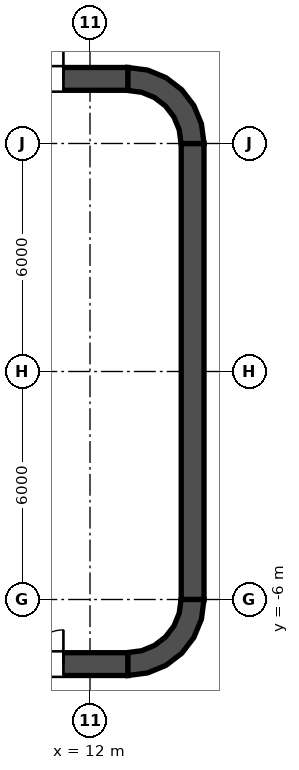
"""IFC4 building model, lengths in metres.
Left out: names, types, materials, properties, quantities, classifications, styles, units other than length and angle.
Written with IfcOpenShell. Run it as: python <this file> out.ifc"""

import sys

from ifc_helpers import new_model, si_unit, direction, frame, frame_2d, origin, place, context, subcontext, project, spatial, polyline, rectangle, outline, extrude, element, fill, save


model = new_model("IFC4")
c1 = context("Model", 3, precision=1e-05, world=origin(), true_north=direction((0.0, 1.0)))
c2 = subcontext(c1, "Body", "Model", "MODEL_VIEW")
j1 = project(units=[si_unit("LENGTHUNIT", "METRE"), si_unit("PLANEANGLEUNIT", "RADIAN")], contexts=[c1])
p1 = place(None, origin())
s1 = spatial("IfcSite", under=j1, at=p1, CompositionType="ELEMENT")
p2 = place(p1, origin())
s2 = spatial("IfcBuilding", under=s1, at=p2, CompositionType="ELEMENT")
p3 = place(p2, frame((0.0, 0.0, 139.8)))
s3 = spatial("IfcBuildingStorey", under=s2, at=p3, CompositionType="ELEMENT", Elevation=139.8)
p4 = place(p3, frame((-13.0, 7.7, 0.0), z_axis=(0.0, 0.0, 1.0), x_axis=(1.0, 0.0, 0.0)))
e1 = element("IfcWall", 1, at=p4, inside=s3, PredefinedType="SHEAR", context=c2, shape_type="SweptSolid", body=[
    extrude(rectangle(XDim=26.0, YDim=0.6, at=frame_2d((13.0, 0.0))), origin(), (0.0, 0.0, 1.0), 4.2),
])
p5 = place(p4, frame((1.7, 0.0, 0.0)))
e2 = element("IfcOpeningElement", 2, at=p5, cuts=e1, PredefinedType="OPENING", context=c2, shape_type="SweptSolid", body=[
    extrude(rectangle(XDim=1.8, YDim=2.1, at=frame_2d((0.9, 1.05))), frame((0.0, 0.3, 0.0), z_axis=(0.0, -1.0, 0.0), x_axis=(1.0, 0.0, 0.0)), (0.0, 0.0, 1.0), 0.6),
])
p6 = place(p4, frame((22.5, 0.0, 0.0)))
e3 = element("IfcOpeningElement", 3, at=p6, cuts=e1, PredefinedType="OPENING", context=c2, shape_type="SweptSolid", body=[
    extrude(rectangle(XDim=1.8, YDim=2.1, at=frame_2d((0.9, 1.05))), frame((0.0, 0.3, 0.0), z_axis=(0.0, -1.0, 0.0), x_axis=(1.0, 0.0, 0.0)), (0.0, 0.0, 1.0), 0.6),
])
p7 = place(p3, frame((-13.0, -7.7, 0.0), z_axis=(0.0, 0.0, 1.0), x_axis=(1.0, 0.0, 0.0)))
e4 = element("IfcWall", 4, at=p7, inside=s3, PredefinedType="SHEAR", context=c2, shape_type="SweptSolid", body=[
    extrude(rectangle(XDim=26.0, YDim=0.6, at=frame_2d((13.0, 0.0))), origin(), (0.0, 0.0, 1.0), 4.2),
])
p8 = place(p7, frame((1.7, 0.0, 0.0)))
e5 = element("IfcOpeningElement", 5, at=p8, cuts=e4, PredefinedType="OPENING", context=c2, shape_type="SweptSolid", body=[
    extrude(rectangle(XDim=1.8, YDim=2.1, at=frame_2d((0.9, 1.05))), frame((0.0, 0.3, 0.0), z_axis=(0.0, -1.0, 0.0), x_axis=(1.0, 0.0, 0.0)), (0.0, 0.0, 1.0), 0.6),
])
p9 = place(p7, frame((22.5, 0.0, 0.0)))
e6 = element("IfcOpeningElement", 6, at=p9, cuts=e4, PredefinedType="OPENING", context=c2, shape_type="SweptSolid", body=[
    extrude(rectangle(XDim=1.8, YDim=2.1, at=frame_2d((0.9, 1.05))), frame((0.0, 0.3, 0.0), z_axis=(0.0, -1.0, 0.0), x_axis=(1.0, 0.0, 0.0)), (0.0, 0.0, 1.0), 0.6),
])
p10 = place(p3, frame((14.7, -6.0, 0.0), z_axis=(0.0, 0.0, 1.0), x_axis=(0.0, 1.0, 0.0)))
e7 = element("IfcWall", 7, at=p10, inside=s3, PredefinedType="SHEAR", context=c2, shape_type="SweptSolid", body=[
    extrude(rectangle(XDim=12.0, YDim=0.6, at=frame_2d((6.0, 0.0))), origin(), (0.0, 0.0, 1.0), 4.2),
])
p11 = place(p3, origin())
e8 = element("IfcWall", 8, at=p11, inside=s3, PredefinedType="SHEAR", context=c2, shape_type="SweptSolid", body=[
    extrude(outline(polyline([(13.0, 8.0), (13.0, 7.395), (13.361, 7.347), (13.698, 7.208), (13.986, 6.986), (14.208, 6.698), (14.347, 6.361), (14.395, 6.0), (15.0, 6.0), (14.932, 6.518), (14.732, 7.0), (14.414, 7.414), (14.0, 7.732), (13.518, 7.932), (13.0, 8.0)])), origin(), (0.0, 0.0, 1.0), 4.2),
])
e9 = element("IfcWall", 9, at=p11, inside=s3, PredefinedType="SHEAR", context=c2, shape_type="SweptSolid", body=[
    extrude(outline(polyline([(15.0, -6.0), (14.395, -6.0), (14.347, -6.361), (14.208, -6.698), (13.986, -6.986), (13.698, -7.208), (13.361, -7.347), (13.0, -7.395), (13.0, -8.0), (13.518, -7.932), (14.0, -7.732), (14.414, -7.414), (14.732, -7.0), (14.932, -6.518), (15.0, -6.0)])), origin(), (0.0, 0.0, 1.0), 4.2),
])
p12 = place(p3, frame((11.8, -7.4, 0.0), z_axis=(0.0, 0.0, 1.0), x_axis=(0.0, 1.0, 0.0)))
e10 = element("IfcWall", 10, at=p12, inside=s3, PredefinedType="SOLIDWALL", context=c2, shape_type="SweptSolid", body=[
    extrude(rectangle(XDim=14.8, YDim=0.4, at=frame_2d((7.4, 0.0))), origin(), (0.0, 0.0, 1.0), 4.05),
])
p13 = place(p12, frame((11.2, 0.0, 0.0)))
e11 = element("IfcOpeningElement", 11, at=p13, cuts=e10, PredefinedType="OPENING", context=c2, shape_type="SweptSolid", body=[
    extrude(rectangle(XDim=1.1, YDim=2.1, at=frame_2d((0.55, 1.05))), frame((0.0, 0.2, 0.0), z_axis=(0.0, -1.0, 0.0), x_axis=(1.0, 0.0, 0.0)), (0.0, 0.0, 1.0), 0.4),
])
p14 = place(p12, frame((8.3, 0.0, 0.0)))
e12 = element("IfcOpeningElement", 12, at=p14, cuts=e10, PredefinedType="OPENING", context=c2, shape_type="SweptSolid", body=[
    extrude(rectangle(XDim=1.1, YDim=2.1, at=frame_2d((0.55, 1.05))), frame((0.0, 0.2, 0.0), z_axis=(0.0, -1.0, 0.0), x_axis=(1.0, 0.0, 0.0)), (0.0, 0.0, 1.0), 0.4),
])
p15 = place(p12, frame((5.4, 0.0, 0.0)))
e13 = element("IfcOpeningElement", 13, at=p15, cuts=e10, PredefinedType="OPENING", context=c2, shape_type="SweptSolid", body=[
    extrude(rectangle(XDim=1.1, YDim=2.1, at=frame_2d((0.55, 1.05))), frame((0.0, 0.2, 0.0), z_axis=(0.0, -1.0, 0.0), x_axis=(1.0, 0.0, 0.0)), (0.0, 0.0, 1.0), 0.4),
])
p16 = place(p12, frame((13.552, 0.0, 0.0)))
e14 = element("IfcOpeningElement", 14, at=p16, cuts=e10, PredefinedType="OPENING", context=c2, shape_type="SweptSolid", body=[
    extrude(rectangle(XDim=0.9, YDim=2.1, at=frame_2d((0.45, 1.05))), frame((0.0, 0.2, 0.0), z_axis=(0.0, -1.0, 0.0), x_axis=(1.0, 0.0, 0.0)), (0.0, 0.0, 1.0), 0.4),
])
p17 = place(p12, frame((0.347, 0.0, 0.0)))
e15 = element("IfcOpeningElement", 15, at=p17, cuts=e10, PredefinedType="OPENING", context=c2, shape_type="SweptSolid", body=[
    extrude(rectangle(XDim=0.9, YDim=2.1, at=frame_2d((0.45, 1.05))), frame((0.0, 0.2, 0.0), z_axis=(0.0, -1.0, 0.0), x_axis=(1.0, 0.0, 0.0)), (0.0, 0.0, 1.0), 0.4),
])
e16 = element("IfcWall", 16, at=p11, inside=s3, PredefinedType="SOLIDWALL", context=c2, shape_type="SweptSolid", body=[
    extrude(outline(polyline([(12.0, -5.675), (12.0, -5.925), (14.15, -5.925), (14.4, -5.925), (14.4, -5.675), (14.4, -3.025), (14.4, -2.775), (14.4, -0.125), (14.4, 0.125), (14.4, 2.775), (14.4, 3.025), (14.4, 5.675), (14.4, 5.925), (14.15, 5.925), (12.0, 5.925), (12.0, 5.675), (14.15, 5.675), (14.15, 3.025), (12.0, 3.025), (12.0, 2.775), (14.15, 2.775), (14.15, 0.125), (12.0, 0.125), (12.0, -0.125), (14.15, -0.125), (14.15, -2.775), (12.0, -2.775), (12.0, -3.025), (14.15, -3.025), (14.15, -5.675), (12.0, -5.675)])), origin(), (0.0, 0.0, 1.0), 4.05),
])
p18 = place(p13, origin())
e17 = element("IfcDoor", 17, at=p18, inside=s3, OperationType="DOUBLE_DOOR_SLIDING", PredefinedType="DOOR", context=c2, shape_type="SweptSolid", body=[
    extrude(rectangle(XDim=1.1, YDim=2.1, at=frame_2d((0.55, 1.05))), frame((0.0, 0.025, 0.0), z_axis=(0.0, -1.0, 0.0), x_axis=(1.0, 0.0, 0.0)), (0.0, 0.0, 1.0), 0.05),
])
fill(e11, e17)
p19 = place(p14, origin())
e18 = element("IfcDoor", 18, at=p19, inside=s3, OperationType="DOUBLE_DOOR_SLIDING", PredefinedType="DOOR", context=c2, shape_type="SweptSolid", body=[
    extrude(rectangle(XDim=1.1, YDim=2.1, at=frame_2d((0.55, 1.05))), frame((0.0, 0.025, 0.0), z_axis=(0.0, -1.0, 0.0), x_axis=(1.0, 0.0, 0.0)), (0.0, 0.0, 1.0), 0.05),
])
fill(e12, e18)
p20 = place(p15, origin())
e19 = element("IfcDoor", 19, at=p20, inside=s3, OperationType="DOUBLE_DOOR_SLIDING", PredefinedType="DOOR", context=c2, shape_type="SweptSolid", body=[
    extrude(rectangle(XDim=1.1, YDim=2.1, at=frame_2d((0.55, 1.05))), frame((0.0, 0.025, 0.0), z_axis=(0.0, -1.0, 0.0), x_axis=(1.0, 0.0, 0.0)), (0.0, 0.0, 1.0), 0.05),
])
fill(e13, e19)
p21 = place(p16, origin())
e20 = element("IfcDoor", 20, at=p21, inside=s3, OperationType="SINGLE_SWING_RIGHT", PredefinedType="DOOR", context=c2, shape_type="SweptSolid", body=[
    extrude(rectangle(XDim=0.9, YDim=2.1, at=frame_2d((0.45, 1.05))), frame((0.0, 0.025, 0.0), z_axis=(0.0, -1.0, 0.0), x_axis=(1.0, 0.0, 0.0)), (0.0, 0.0, 1.0), 0.05),
])
fill(e14, e20)
p22 = place(p17, origin())
e21 = element("IfcDoor", 21, at=p22, inside=s3, OperationType="SINGLE_SWING_RIGHT", PredefinedType="DOOR", context=c2, shape_type="SweptSolid", body=[
    extrude(rectangle(XDim=0.9, YDim=2.1, at=frame_2d((0.45, 1.05))), frame((0.0, 0.025, 0.0), z_axis=(0.0, -1.0, 0.0), x_axis=(1.0, 0.0, 0.0)), (0.0, 0.0, 1.0), 0.05),
])
fill(e15, e21)
p23 = place(p6, origin())
e22 = element("IfcDoor", 22, at=p23, inside=s3, OperationType="DOUBLE_DOOR_SINGLE_SWING", PredefinedType="DOOR", context=c2, shape_type="SweptSolid", body=[
    extrude(rectangle(XDim=1.8, YDim=2.1, at=frame_2d((0.9, 1.05))), frame((0.0, 0.025, 0.0), z_axis=(0.0, -1.0, 0.0), x_axis=(1.0, 0.0, 0.0)), (0.0, 0.0, 1.0), 0.05),
])
fill(e3, e22)
p24 = place(p9, origin())
e23 = element("IfcDoor", 23, at=p24, inside=s3, OperationType="DOUBLE_DOOR_SINGLE_SWING", PredefinedType="DOOR", context=c2, shape_type="SweptSolid", body=[
    extrude(rectangle(XDim=1.8, YDim=2.1, at=frame_2d((0.9, 1.05))), frame((0.0, 0.025, 0.0), z_axis=(0.0, -1.0, 0.0), x_axis=(1.0, 0.0, 0.0)), (0.0, 0.0, 1.0), 0.05),
])
fill(e6, e23)
save(model, sys.argv[1])
